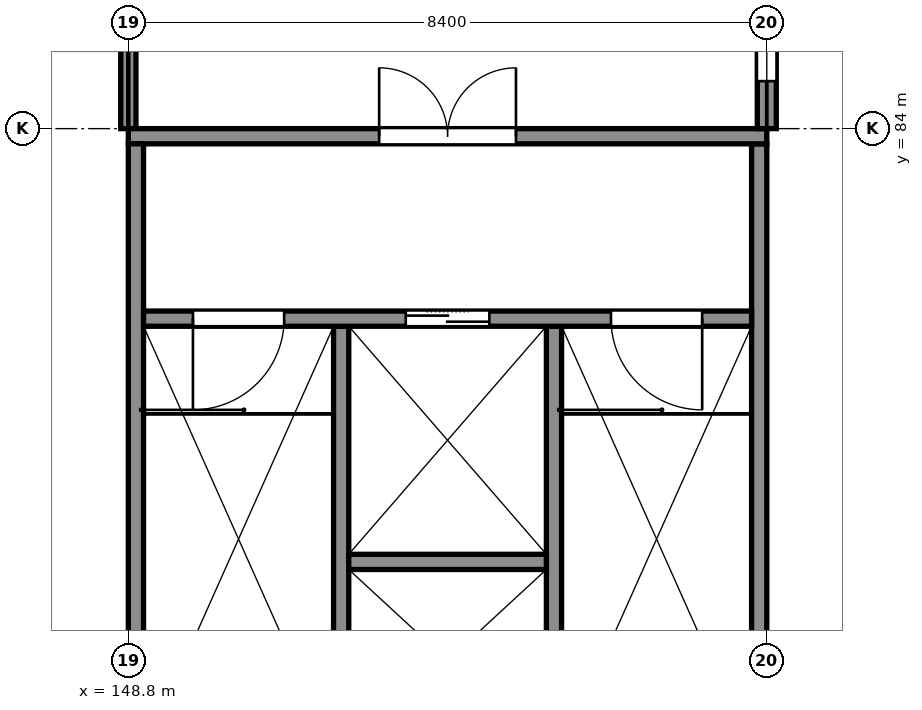
"""IFC4 building model, lengths in metres.
Left out: names, types, materials, properties, quantities, classifications, styles, units other than length and angle.
Written with IfcOpenShell. Run it as: python <this file> out.ifc"""

import sys

from ifc_helpers import new_model, si_unit, direction, frame, frame_2d, origin, place, context, subcontext, project, spatial, polyline, rectangle, outline, extrude, element, fill, save


model = new_model("IFC4")
c1 = context("Model", 3, precision=1e-05, world=origin(), true_north=direction((0.0, 1.0)))
c2 = subcontext(c1, "Body", "Model", "MODEL_VIEW")
j1 = project(units=[si_unit("LENGTHUNIT", "METRE"), si_unit("PLANEANGLEUNIT", "RADIAN")], contexts=[c1])
p1 = place(None, origin())
s1 = spatial("IfcSite", under=j1, at=p1, CompositionType="ELEMENT")
p2 = place(p1, origin())
s2 = spatial("IfcBuilding", under=s1, at=p2, CompositionType="ELEMENT")
p3 = place(p2, frame((0.0, 0.0, 10.5)))
s3 = spatial("IfcBuildingStorey", under=s2, at=p3, CompositionType="ELEMENT", Elevation=10.5)
p4 = place(p3, frame((148.8, 83.9, 0.0), z_axis=(0.0, 0.0, 1.0), x_axis=(1.0, 0.0, 0.0)))
e1 = element("IfcWall", 1, at=p4, inside=s3, PredefinedType="SHEAR", context=c2, shape_type="SweptSolid", body=[
    extrude(outline(polyline([(0.0, 0.0), (8.4, 0.0), (8.4, 9.4), (8.1, 9.486), (7.8, 9.571), (6.9, 9.829), (6.6, 9.914), (6.0, 10.086), (5.7, 10.171), (4.8, 10.429), (4.5, 10.514), (3.9, 10.686), (3.6, 10.771), (2.7, 11.029), (2.4, 11.114), (1.8, 11.286), (1.5, 11.371), (0.6, 11.629), (0.3, 11.714), (0.0, 11.8), (0.0, 0.0)])), frame((0.0, 0.1, 0.0), z_axis=(0.0, -1.0, 0.0), x_axis=(1.0, 0.0, 0.0)), (0.0, 0.0, 1.0), 0.2),
])
p5 = place(p4, frame((3.3, 0.0, 0.0)))
e2 = element("IfcOpeningElement", 2, at=p5, cuts=e1, PredefinedType="OPENING", context=c2, shape_type="SweptSolid", body=[
    extrude(rectangle(XDim=1.8, YDim=2.1, at=frame_2d((0.9, 1.05))), frame((0.0, 0.11, 0.0), z_axis=(0.0, -1.0, 0.0), x_axis=(1.0, 0.0, 0.0)), (0.0, 0.0, 1.0), 0.22),
])
p6 = place(p3, frame((148.9, 75.8, 0.0), z_axis=(0.0, 0.0, 1.0), x_axis=(0.0, 1.0, 0.0)))
e3 = element("IfcWall", 3, at=p6, inside=s3, PredefinedType="SHEAR", context=c2, shape_type="SweptSolid", body=[
    extrude(rectangle(XDim=8.0, YDim=0.2, at=frame_2d((4.0, 0.0))), origin(), (0.0, 0.0, 1.0), 11.8),
])
p7 = place(p3, frame((157.1, 75.8, 0.0), z_axis=(0.0, 0.0, 1.0), x_axis=(0.0, 1.0, 0.0)))
e4 = element("IfcWall", 4, at=p7, inside=s3, PredefinedType="SHEAR", context=c2, shape_type="SweptSolid", body=[
    extrude(rectangle(XDim=8.0, YDim=0.2, at=frame_2d((4.0, 0.0))), origin(), (0.0, 0.0, 1.0), 9.43),
])
p8 = place(p3, frame((149.0, 81.5, 0.0), z_axis=(0.0, 0.0, 1.0), x_axis=(1.0, 0.0, 0.0)))
e5 = element("IfcWall", 5, at=p8, inside=s3, PredefinedType="SHEAR", context=c2, shape_type="SweptSolid", body=[
    extrude(outline(polyline([(0.0, 0.0), (8.0, 0.0), (8.0, 9.457), (7.704, 9.542), (7.407, 9.626), (6.815, 9.796), (6.519, 9.88), (5.926, 10.05), (5.63, 10.134), (5.037, 10.304), (4.741, 10.388), (4.148, 10.558), (3.852, 10.642), (3.259, 10.812), (2.963, 10.896), (2.37, 11.066), (2.074, 11.15), (1.481, 11.32), (1.185, 11.404), (0.593, 11.574), (0.296, 11.658), (0.0, 11.743), (0.0, 0.0)])), frame((0.0, 0.1, 0.0), z_axis=(0.0, -1.0, 0.0), x_axis=(1.0, 0.0, 0.0)), (0.0, 0.0, 1.0), 0.2),
])
p9 = place(p8, frame((0.65, 0.0, 0.0)))
e6 = element("IfcOpeningElement", 6, at=p9, cuts=e5, PredefinedType="OPENING", context=c2, shape_type="SweptSolid", body=[
    extrude(rectangle(XDim=1.2, YDim=2.1, at=frame_2d((0.6, 1.05))), frame((0.0, 0.11, 0.0), z_axis=(0.0, -1.0, 0.0), x_axis=(1.0, 0.0, 0.0)), (0.0, 0.0, 1.0), 0.22),
])
p10 = place(p8, frame((6.15, 0.0, 0.0)))
e7 = element("IfcOpeningElement", 7, at=p10, cuts=e5, PredefinedType="OPENING", context=c2, shape_type="SweptSolid", body=[
    extrude(rectangle(XDim=1.2, YDim=2.1, at=frame_2d((0.6, 1.05))), frame((0.0, 0.11, 0.0), z_axis=(0.0, -1.0, 0.0), x_axis=(1.0, 0.0, 0.0)), (0.0, 0.0, 1.0), 0.22),
])
p11 = place(p8, frame((3.45, 0.0, 0.0)))
e8 = element("IfcOpeningElement", 8, at=p11, cuts=e5, PredefinedType="OPENING", context=c2, shape_type="SweptSolid", body=[
    extrude(rectangle(XDim=1.1, YDim=2.1, at=frame_2d((0.55, 1.05))), frame((0.0, 0.11, 0.0), z_axis=(0.0, -1.0, 0.0), x_axis=(1.0, 0.0, 0.0)), (0.0, 0.0, 1.0), 0.22),
])
p12 = place(p3, frame((151.6, 75.8, 0.0), z_axis=(0.0, 0.0, 1.0), x_axis=(0.0, 1.0, 0.0)))
e9 = element("IfcWall", 9, at=p12, inside=s3, PredefinedType="SHEAR", context=c2, shape_type="SweptSolid", body=[
    extrude(rectangle(XDim=5.6, YDim=0.2, at=frame_2d((2.8, 0.0))), origin(), (0.0, 0.0, 1.0), 11.0),
])
p13 = place(p3, frame((154.4, 75.8, 0.0), z_axis=(0.0, 0.0, 1.0), x_axis=(0.0, 1.0, 0.0)))
e10 = element("IfcWall", 10, at=p13, inside=s3, PredefinedType="SHEAR", context=c2, shape_type="SweptSolid", body=[
    extrude(rectangle(XDim=5.6, YDim=0.2, at=frame_2d((2.8, 0.0))), origin(), (0.0, 0.0, 1.0), 10.2),
])
p14 = place(p3, frame((151.7, 78.3, 0.0), z_axis=(0.0, 0.0, 1.0), x_axis=(1.0, 0.0, 0.0)))
e11 = element("IfcWall", 11, at=p14, inside=s3, PredefinedType="SHEAR", context=c2, shape_type="SweptSolid", body=[
    extrude(outline(polyline([(0.0, 0.0), (2.6, 0.0), (2.6, 10.229), (2.311, 10.311), (2.022, 10.394), (1.733, 10.476), (1.444, 10.559), (1.156, 10.641), (0.867, 10.724), (0.578, 10.806), (0.289, 10.889), (0.0, 10.971), (0.0, 0.0)])), frame((0.0, 0.1, 0.0), z_axis=(0.0, -1.0, 0.0), x_axis=(1.0, 0.0, 0.0)), (0.0, 0.0, 1.0), 0.2),
])
p15 = place(p3, frame((157.2, 84.0, 0.0), z_axis=(0.0, 0.0, 1.0), x_axis=(0.0, 1.0, 0.0)))
e12 = element("IfcWall", 12, at=p15, inside=s3, PredefinedType="SOLIDWALL", context=c2, shape_type="SweptSolid", body=[
    extrude(rectangle(XDim=8.05, YDim=0.25, at=frame_2d((4.025, 0.0))), origin(), (0.0, 0.0, 1.0), 9.342),
])
p16 = place(p15, frame((0.625, 0.0, 0.9)))
e13 = element("IfcOpeningElement", 13, at=p16, cuts=e12, PredefinedType="OPENING", context=c2, shape_type="SweptSolid", body=[
    extrude(rectangle(XDim=1.2, YDim=6.0, at=frame_2d((0.6, 3.0))), frame((0.0, 0.135, 0.0), z_axis=(0.0, -1.0, 0.0), x_axis=(1.0, 0.0, 0.0)), (0.0, 0.0, 1.0), 0.27),
])
p17 = place(p15, frame((3.425, 0.0, 0.9)))
e14 = element("IfcOpeningElement", 14, at=p17, cuts=e12, PredefinedType="OPENING", context=c2, shape_type="SweptSolid", body=[
    extrude(rectangle(XDim=1.2, YDim=6.0, at=frame_2d((0.6, 3.0))), frame((0.0, 0.135, 0.0), z_axis=(0.0, -1.0, 0.0), x_axis=(1.0, 0.0, 0.0)), (0.0, 0.0, 1.0), 0.27),
])
p18 = place(p15, frame((6.225, 0.0, 0.9)))
e15 = element("IfcOpeningElement", 15, at=p18, cuts=e12, PredefinedType="OPENING", context=c2, shape_type="SweptSolid", body=[
    extrude(rectangle(XDim=1.2, YDim=6.0, at=frame_2d((0.6, 3.0))), frame((0.0, 0.135, 0.0), z_axis=(0.0, -1.0, 0.0), x_axis=(1.0, 0.0, 0.0)), (0.0, 0.0, 1.0), 0.27),
])
p19 = place(p3, frame((148.8, 84.0, 0.0), z_axis=(0.0, 0.0, 1.0), x_axis=(0.0, 1.0, 0.0)))
e16 = element("IfcWall", 16, at=p19, inside=s3, PredefinedType="PARTITIONING", context=c2, shape_type="SweptSolid", body=[
    extrude(rectangle(XDim=8.05, YDim=0.2, at=frame_2d((4.025, 0.0))), origin(), (0.0, 0.0, 1.0), 8.4),
])
p20 = place(p19, frame((1.025, 0.0, 0.0)))
e17 = element("IfcOpeningElement", 17, at=p20, cuts=e16, PredefinedType="OPENING", context=c2, shape_type="SweptSolid", body=[
    extrude(rectangle(XDim=2.4, YDim=2.4, at=frame_2d((1.2, 1.2))), frame((0.0, 0.11, 0.0), z_axis=(0.0, -1.0, 0.0), x_axis=(1.0, 0.0, 0.0)), (0.0, 0.0, 1.0), 0.22),
])
p21 = place(p16, origin())
e18 = element("IfcWindow", 18, at=p21, inside=s3, PartitioningType="SINGLE_PANEL", PredefinedType="WINDOW", context=c2, shape_type="SweptSolid", body=[
    extrude(rectangle(XDim=1.2, YDim=6.0, at=frame_2d((0.6, 3.0))), frame((0.0, 0.105, 0.0), z_axis=(0.0, -1.0, 0.0), x_axis=(1.0, 0.0, 0.0)), (0.0, 0.0, 1.0), 0.06),
])
fill(e13, e18)
p22 = place(p5, origin())
e19 = element("IfcDoor", 19, at=p22, inside=s3, OperationType="DOUBLE_DOOR_SINGLE_SWING", PredefinedType="DOOR", context=c2, shape_type="SweptSolid", body=[
    extrude(rectangle(XDim=1.8, YDim=2.1, at=frame_2d((0.9, 1.05))), frame((0.0, 0.025, 0.0), z_axis=(0.0, -1.0, 0.0), x_axis=(1.0, 0.0, 0.0)), (0.0, 0.0, 1.0), 0.05),
])
fill(e2, e19)
p23 = place(p9, origin())
e20 = element("IfcDoor", 20, at=p23, inside=s3, OperationType="SINGLE_SWING_LEFT", PredefinedType="DOOR", context=c2, shape_type="SweptSolid", body=[
    extrude(rectangle(XDim=1.2, YDim=2.1, at=frame_2d((0.6, 1.05))), frame((0.0, 0.025, 0.0), z_axis=(0.0, -1.0, 0.0), x_axis=(1.0, 0.0, 0.0)), (0.0, 0.0, 1.0), 0.05),
])
fill(e6, e20)
p24 = place(p10, origin())
e21 = element("IfcDoor", 21, at=p24, inside=s3, OperationType="SINGLE_SWING_RIGHT", PredefinedType="DOOR", context=c2, shape_type="SweptSolid", body=[
    extrude(rectangle(XDim=1.2, YDim=2.1, at=frame_2d((0.6, 1.05))), frame((0.0, 0.025, 0.0), z_axis=(0.0, -1.0, 0.0), x_axis=(1.0, 0.0, 0.0)), (0.0, 0.0, 1.0), 0.05),
])
fill(e7, e21)
p25 = place(p11, origin())
e22 = element("IfcDoor", 22, at=p25, inside=s3, OperationType="DOUBLE_DOOR_SLIDING", PredefinedType="DOOR", context=c2, shape_type="SweptSolid", body=[
    extrude(rectangle(XDim=1.1, YDim=2.1, at=frame_2d((0.55, 1.05))), frame((0.0, 0.025, 0.0), z_axis=(0.0, -1.0, 0.0), x_axis=(1.0, 0.0, 0.0)), (0.0, 0.0, 1.0), 0.05),
])
fill(e8, e22)
save(model, sys.argv[1])
